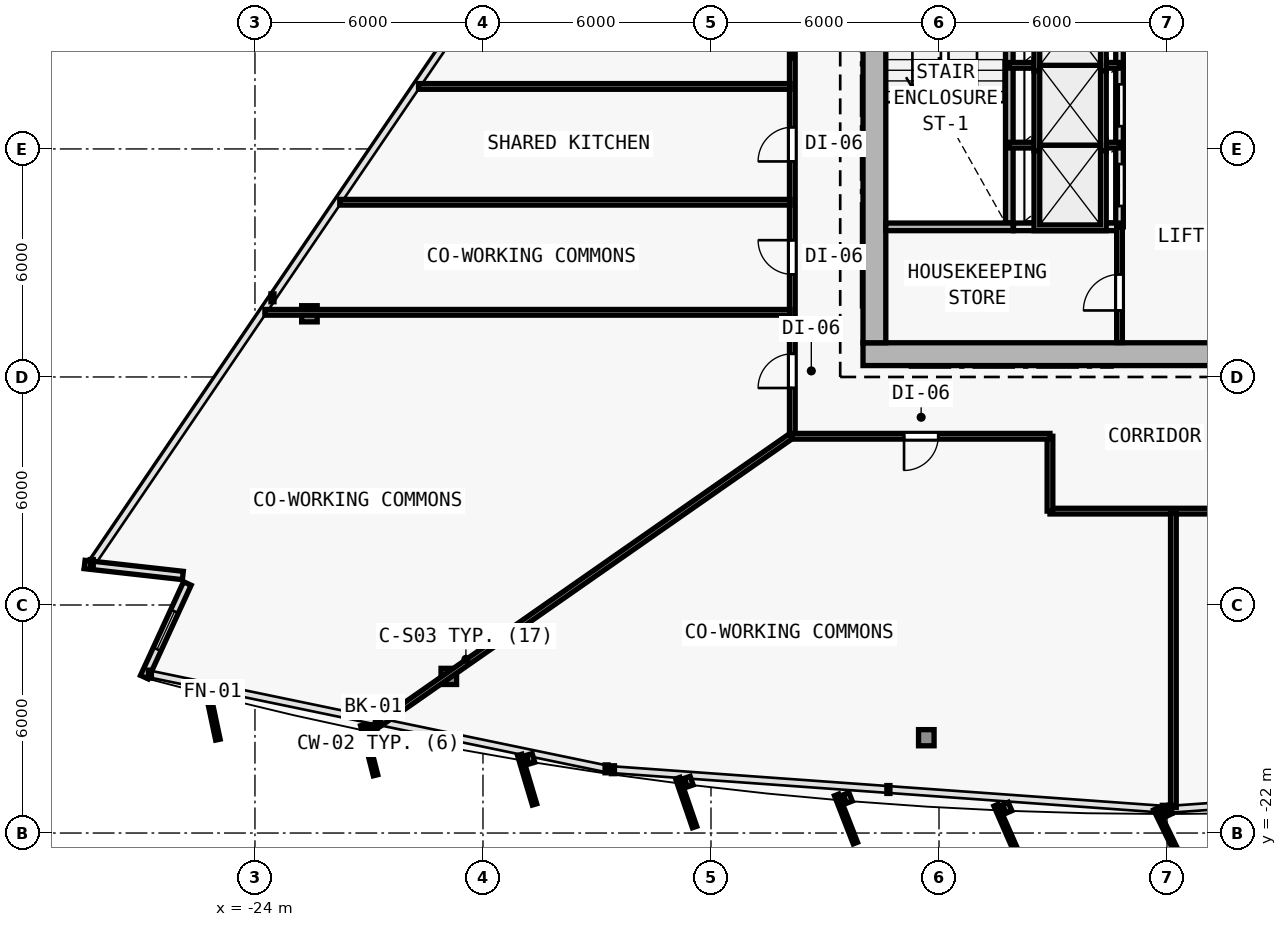
"""IFC4 building model, lengths in metres.
Left out: names, types, materials, properties, quantities, classifications, styles, units other than length and angle.
Written with IfcOpenShell. Run it as: python <this file> out.ifc"""

import sys

from ifc_helpers import new_model, si_unit, direction, frame, frame_2d, origin, origin_2d, place, context, subcontext, project, spatial, rectangle, i_section, extrude, element, fill, save


model = new_model("IFC4")
c1 = context("Model", 3, precision=1e-05, world=origin(), true_north=direction((0.0, 1.0)))
c2 = subcontext(c1, "Body", "Model", "MODEL_VIEW")
j1 = project(units=[si_unit("LENGTHUNIT", "METRE"), si_unit("PLANEANGLEUNIT", "RADIAN")], contexts=[c1])
p1 = place(None, origin())
s1 = spatial("IfcSite", under=j1, at=p1, CompositionType="ELEMENT")
p2 = place(p1, origin())
s2 = spatial("IfcBuilding", under=s1, at=p2, CompositionType="ELEMENT")
p3 = place(p2, frame((0.0, 0.0, 100.5)))
s3 = spatial("IfcBuildingStorey", under=s2, at=p3, CompositionType="ELEMENT", Elevation=100.5)
for number, where, z_axis, x_axis in (
    (1, (-7.7, -9.4, 0.0), (0.0, 0.0, 1.0), (1.0, 0.0, 0.0)),
    (2, (0.0, -9.4, 0.0), (0.0, 0.0, 1.0), (1.0, 0.0, 0.0)),
):
    element("IfcColumn", number, at=place(p3, frame(where, z_axis=z_axis, x_axis=x_axis)), inside=s3, PredefinedType="COLUMN", context=c2, shape_type="SweptSolid", body=[
        extrude(i_section(OverallWidth=0.409, OverallDepth=0.425, WebThickness=0.021, FlangeThickness=0.034, FilletRadius=0.015, at=origin_2d()), origin(), (0.0, 0.0, 1.0), 3.6),
    ])
p4 = place(p3, frame((-18.899, -17.879, 0.006), z_axis=(0.020664238418, 0.033511412961, 0.999224686671), x_axis=(-0.851183725565, 0.524867855115, 0.0)))
e3 = element("IfcColumn", 3, at=p4, inside=s3, PredefinedType="COLUMN", context=c2, shape_type="SweptSolid", body=[
    extrude(i_section(OverallWidth=0.409, OverallDepth=0.425, WebThickness=0.021, FlangeThickness=0.034, FilletRadius=0.015, at=origin_2d()), origin(), (0.0, 0.0, 1.0), 3.592),
])
p5 = place(p3, frame((-6.334, -19.492, 0.006), z_axis=(0.006866324617, 0.035215407439, 0.999356157066), x_axis=(-0.981516643497, 0.191376797284, 0.0)))
e4 = element("IfcColumn", 4, at=p5, inside=s3, PredefinedType="COLUMN", context=c2, shape_type="SweptSolid", body=[
    extrude(i_section(OverallWidth=0.409, OverallDepth=0.425, WebThickness=0.021, FlangeThickness=0.034, FilletRadius=0.015, at=origin_2d()), origin(), (0.0, 0.0, 1.0), 3.591),
])
p6 = place(p3, frame((-22.567, -8.338, 0.006), z_axis=(0.025224163578, 0.021620711639, 0.999447990843), x_axis=(-0.650791373456, 0.759256602365, 0.0)))
e5 = element("IfcColumn", 5, at=p6, inside=s3, PredefinedType="COLUMN", context=c2, shape_type="SweptSolid", body=[
    extrude(i_section(OverallWidth=0.409, OverallDepth=0.425, WebThickness=0.021, FlangeThickness=0.034, FilletRadius=0.015, at=origin_2d()), origin(), (0.0, 0.0, 1.0), 3.591),
])
p7 = place(p3, frame((-25.898, -15.223, 0.0), z_axis=(0.0, 0.0, 1.0), x_axis=(-0.993827522589, 0.110936267041, 0.0)))
e6 = element("IfcWall", 6, at=p7, inside=s3, PredefinedType="SOLIDWALL", context=c2, shape_type="SweptSolid", body=[
    extrude(rectangle(XDim=2.601, YDim=0.22, at=frame_2d((1.301, 0.0))), origin(), (0.0, 0.0, 1.0), 3.35),
])
p8 = place(p3, frame((-26.911, -17.897, 0.0), z_axis=(0.0, 0.0, 1.0), x_axis=(0.417504190978, 0.908674997189, 0.0)))
e7 = element("IfcWall", 7, at=p8, inside=s3, PredefinedType="SOLIDWALL", context=c2, shape_type="SweptSolid", body=[
    extrude(rectangle(XDim=2.711, YDim=0.22, at=frame_2d((1.355, 0.0))), origin(), (0.0, 0.0, 1.0), 3.35),
])
p9 = place(p8, frame((0.805, 0.0, 0.62)))
e8 = element("IfcOpeningElement", 8, at=p9, cuts=e7, PredefinedType="OPENING", context=c2, shape_type="SweptSolid", body=[
    extrude(rectangle(XDim=1.1, YDim=1.8, at=frame_2d((0.55, 0.9))), frame((0.0, 0.12, 0.0), z_axis=(0.0, -1.0, 0.0), x_axis=(1.0, 0.0, 0.0)), (0.0, 0.0, 1.0), 0.24),
])
p10 = place(p3, frame((-8.0, -9.4, 0.0), z_axis=(0.0, 0.0, 1.0), x_axis=(1.0, 0.0, 0.0)))
e9 = element("IfcWall", 9, at=p10, inside=s3, PredefinedType="SHEAR", context=c2, shape_type="SweptSolid", body=[
    extrude(rectangle(XDim=16.0, YDim=0.6, at=frame_2d((8.0, 0.0))), origin(), (0.0, 0.0, 1.0), 3.35),
])
p11 = place(p10, frame((9.65, 0.0, 0.0)))
e10 = element("IfcOpeningElement", 10, at=p11, cuts=e9, PredefinedType="OPENING", context=c2, shape_type="SweptSolid", body=[
    extrude(rectangle(XDim=1.5, YDim=2.2, at=frame_2d((0.75, 1.1))), frame((0.0, 0.31, 0.0), z_axis=(0.0, -1.0, 0.0), x_axis=(1.0, 0.0, 0.0)), (0.0, 0.0, 1.0), 0.62),
])
p12 = place(p3, frame((-7.7, -9.1, 0.0), z_axis=(0.0, 0.0, 1.0), x_axis=(0.0, 1.0, 0.0)))
e11 = element("IfcWall", 11, at=p12, inside=s3, PredefinedType="SHEAR", context=c2, shape_type="SweptSolid", body=[
    extrude(rectangle(XDim=19.0, YDim=0.6, at=frame_2d((9.5, 0.0))), origin(), (0.0, 0.0, 1.0), 3.35),
])
p13 = place(p12, frame((12.65, 0.0, 0.0)))
e12 = element("IfcOpeningElement", 12, at=p13, cuts=e11, PredefinedType="OPENING", context=c2, shape_type="SweptSolid", body=[
    extrude(rectangle(XDim=1.1, YDim=2.15, at=frame_2d((0.55, 1.075))), frame((0.0, 0.31, 0.0), z_axis=(0.0, -1.0, 0.0), x_axis=(1.0, 0.0, 0.0)), (0.0, 0.0, 1.0), 0.62),
])
p14 = place(p3, frame((-4.15, -5.95, 0.0), z_axis=(0.0, 0.0, 1.0), x_axis=(0.0, 1.0, 0.0)))
e13 = element("IfcWall", 13, at=p14, inside=s3, PredefinedType="SOLIDWALL", context=c2, shape_type="SweptSolid", body=[
    extrude(rectangle(XDim=7.2, YDim=0.2, at=frame_2d((3.6, 0.0))), origin(), (0.0, 0.0, 1.0), 3.35),
])
p15 = place(p3, frame((-1.25, -6.05, 0.0), z_axis=(0.0, 0.0, 1.0), x_axis=(0.0, 1.0, 0.0)))
e14 = element("IfcWall", 14, at=p15, inside=s3, PredefinedType="SOLIDWALL", context=c2, shape_type="SweptSolid", body=[
    extrude(rectangle(XDim=8.7, YDim=0.2, at=frame_2d((4.35, 0.0))), origin(), (0.0, 0.0, 1.0), 3.35),
])
p16 = place(p15, frame((0.55, 0.0, 0.0)))
e15 = element("IfcOpeningElement", 15, at=p16, cuts=e14, PredefinedType="OPENING", context=c2, shape_type="SweptSolid", body=[
    extrude(rectangle(XDim=1.1, YDim=2.15, at=frame_2d((0.55, 1.075))), frame((0.0, 0.11, 0.0), z_axis=(0.0, -1.0, 0.0), x_axis=(1.0, 0.0, 0.0)), (0.0, 0.0, 1.0), 0.22),
])
p17 = place(p15, frame((2.65, 0.0, 0.0)))
e16 = element("IfcOpeningElement", 16, at=p17, cuts=e14, PredefinedType="OPENING", context=c2, shape_type="SweptSolid", body=[
    extrude(rectangle(XDim=1.1, YDim=2.15, at=frame_2d((0.55, 1.075))), frame((0.0, 0.11, 0.0), z_axis=(0.0, -1.0, 0.0), x_axis=(1.0, 0.0, 0.0)), (0.0, 0.0, 1.0), 0.22),
])
p18 = place(p15, frame((4.75, 0.0, 0.0)))
e17 = element("IfcOpeningElement", 17, at=p18, cuts=e14, PredefinedType="OPENING", context=c2, shape_type="SweptSolid", body=[
    extrude(rectangle(XDim=1.1, YDim=2.15, at=frame_2d((0.55, 1.075))), frame((0.0, 0.11, 0.0), z_axis=(0.0, -1.0, 0.0), x_axis=(1.0, 0.0, 0.0)), (0.0, 0.0, 1.0), 0.22),
])
p19 = place(p15, frame((6.85, 0.0, 0.0)))
e18 = element("IfcOpeningElement", 18, at=p19, cuts=e14, PredefinedType="OPENING", context=c2, shape_type="SweptSolid", body=[
    extrude(rectangle(XDim=1.1, YDim=2.15, at=frame_2d((0.55, 1.075))), frame((0.0, 0.11, 0.0), z_axis=(0.0, -1.0, 0.0), x_axis=(1.0, 0.0, 0.0)), (0.0, 0.0, 1.0), 0.22),
])
for number, where, z_axis, x_axis in (
    (19, (-4.15, -3.9, 0.0), (0.0, 0.0, 1.0), (1.0, 0.0, 0.0)),
    (20, (-4.15, -1.8, 0.0), (0.0, 0.0, 1.0), (1.0, 0.0, 0.0)),
):
    element("IfcWall", number, at=place(p3, frame(where, z_axis=z_axis, x_axis=x_axis)), inside=s3, PredefinedType="PARTITIONING", context=c2, shape_type="SweptSolid", body=[
        extrude(rectangle(XDim=2.9, YDim=0.15, at=frame_2d((1.45, 0.0))), origin(), (0.0, 0.0, 1.0), 3.35),
    ])
p20 = place(p3, frame((-7.4, -6.05, 0.0), z_axis=(0.0, 0.0, 1.0), x_axis=(1.0, 0.0, 0.0)))
e21 = element("IfcWall", 21, at=p20, inside=s3, PredefinedType="SOLIDWALL", context=c2, shape_type="SweptSolid", body=[
    extrude(rectangle(XDim=3.35, YDim=0.2, at=frame_2d((1.675, 0.0))), origin(), (0.0, 0.0, 1.0), 3.35),
])
p21 = place(p3, frame((-4.04, -6.05, 0.0), z_axis=(0.0, 0.0, 1.0), x_axis=(1.0, 0.0, 0.0)))
e22 = element("IfcWall", 22, at=p21, inside=s3, PredefinedType="SOLIDWALL", context=c2, shape_type="SweptSolid", body=[
    extrude(rectangle(XDim=2.79, YDim=0.2, at=frame_2d((1.395, 0.0))), origin(), (0.0, 0.0, 1.0), 3.35),
])
p22 = place(p3, frame((-1.25, -9.095, 0.0), z_axis=(0.0, 0.0, 1.0), x_axis=(0.0, 1.0, 0.0)))
e23 = element("IfcWall", 23, at=p22, inside=s3, PredefinedType="PARTITIONING", context=c2, shape_type="SweptSolid", body=[
    extrude(rectangle(XDim=3.045, YDim=0.15, at=frame_2d((1.522, 0.0))), origin(), (0.0, 0.0, 1.0), 3.35),
])
p23 = place(p22, frame((0.845, 0.0, 0.0)))
e24 = element("IfcOpeningElement", 24, at=p23, cuts=e23, PredefinedType="OPENING", context=c2, shape_type="SweptSolid", body=[
    extrude(rectangle(XDim=0.95, YDim=2.1, at=frame_2d((0.475, 1.05))), frame((0.0, 0.085, 0.0), z_axis=(0.0, -1.0, 0.0), x_axis=(1.0, 0.0, 0.0)), (0.0, 0.0, 1.0), 0.17),
])
p24 = place(p3, frame((-9.86, -11.56, 0.0), z_axis=(0.0, 0.0, 1.0), x_axis=(0.0, 1.0, 0.0)))
e25 = element("IfcWall", 25, at=p24, inside=s3, PredefinedType="PARTITIONING", context=c2, shape_type="SweptSolid", body=[
    extrude(rectangle(XDim=19.986, YDim=0.15, at=frame_2d((9.993, 0.0))), origin(), (0.0, 0.0, 1.0), 2.705),
])
p25 = place(p24, frame((10.241, 0.0, 0.0)))
e26 = element("IfcOpeningElement", 26, at=p25, cuts=e25, PredefinedType="OPENING", context=c2, shape_type="SweptSolid", body=[
    extrude(rectangle(XDim=0.9, YDim=2.1, at=frame_2d((0.45, 1.05))), frame((0.0, 0.085, 0.0), z_axis=(0.0, -1.0, 0.0), x_axis=(1.0, 0.0, 0.0)), (0.0, 0.0, 1.0), 0.17),
])
p26 = place(p24, frame((7.231, 0.0, 0.0)))
e27 = element("IfcOpeningElement", 27, at=p26, cuts=e25, PredefinedType="OPENING", context=c2, shape_type="SweptSolid", body=[
    extrude(rectangle(XDim=0.9, YDim=2.1, at=frame_2d((0.45, 1.05))), frame((0.0, 0.085, 0.0), z_axis=(0.0, -1.0, 0.0), x_axis=(1.0, 0.0, 0.0)), (0.0, 0.0, 1.0), 0.17),
])
p27 = place(p24, frame((4.259, 0.0, 0.0)))
e28 = element("IfcOpeningElement", 28, at=p27, cuts=e25, PredefinedType="OPENING", context=c2, shape_type="SweptSolid", body=[
    extrude(rectangle(XDim=0.9, YDim=2.1, at=frame_2d((0.45, 1.05))), frame((0.0, 0.085, 0.0), z_axis=(0.0, -1.0, 0.0), x_axis=(1.0, 0.0, 0.0)), (0.0, 0.0, 1.0), 0.17),
])
p28 = place(p24, frame((1.27, 0.0, 0.0)))
e29 = element("IfcOpeningElement", 29, at=p28, cuts=e25, PredefinedType="OPENING", context=c2, shape_type="SweptSolid", body=[
    extrude(rectangle(XDim=0.9, YDim=2.1, at=frame_2d((0.45, 1.05))), frame((0.0, 0.085, 0.0), z_axis=(0.0, -1.0, 0.0), x_axis=(1.0, 0.0, 0.0)), (0.0, 0.0, 1.0), 0.17),
])
p29 = place(p24, frame((16.663, 0.0, 0.0)))
e30 = element("IfcOpeningElement", 30, at=p29, cuts=e25, PredefinedType="OPENING", context=c2, shape_type="SweptSolid", body=[
    extrude(rectangle(XDim=0.9, YDim=2.1, at=frame_2d((0.45, 1.05))), frame((0.0, 0.085, 0.0), z_axis=(0.0, -1.0, 0.0), x_axis=(1.0, 0.0, 0.0)), (0.0, 0.0, 1.0), 0.17),
])
p30 = place(p24, frame((12.847, 0.0, 0.0)))
e31 = element("IfcOpeningElement", 31, at=p30, cuts=e25, PredefinedType="OPENING", context=c2, shape_type="SweptSolid", body=[
    extrude(rectangle(XDim=0.9, YDim=2.1, at=frame_2d((0.45, 1.05))), frame((0.0, 0.085, 0.0), z_axis=(0.0, -1.0, 0.0), x_axis=(1.0, 0.0, 0.0)), (0.0, 0.0, 1.0), 0.17),
])
p31 = place(p3, frame((3.08, -13.53, 0.0), z_axis=(0.0, 0.0, 1.0), x_axis=(-1.0, 0.0, 0.0)))
e32 = element("IfcWall", 32, at=p31, inside=s3, PredefinedType="PARTITIONING", context=c2, shape_type="SweptSolid", body=[
    extrude(rectangle(XDim=6.16, YDim=0.15, at=frame_2d((3.08, 0.0))), origin(), (0.0, 0.0, 1.0), 2.775),
])
p32 = place(p3, frame((-3.08, -13.53, 0.0), z_axis=(0.0, 0.0, 1.0), x_axis=(0.0, 1.0, 0.0)))
e33 = element("IfcWall", 33, at=p32, inside=s3, PredefinedType="PARTITIONING", context=c2, shape_type="SweptSolid", body=[
    extrude(rectangle(XDim=1.97, YDim=0.15, at=frame_2d((0.985, 0.0))), origin(), (0.0, 0.0, 1.0), 2.775),
])
p33 = place(p3, frame((-3.08, -11.56, 0.0), z_axis=(0.0, 0.0, 1.0), x_axis=(-1.0, 0.0, 0.0)))
e34 = element("IfcWall", 34, at=p33, inside=s3, PredefinedType="PARTITIONING", context=c2, shape_type="SweptSolid", body=[
    extrude(rectangle(XDim=6.78, YDim=0.15, at=frame_2d((3.39, 0.0))), origin(), (0.0, 0.0, 1.0), 3.35),
])
p34 = place(p33, frame((2.94, 0.0, 0.0)))
e35 = element("IfcOpeningElement", 35, at=p34, cuts=e34, PredefinedType="OPENING", context=c2, shape_type="SweptSolid", body=[
    extrude(rectangle(XDim=0.9, YDim=2.1, at=frame_2d((0.45, 1.05))), frame((0.0, 0.085, 0.0), z_axis=(0.0, -1.0, 0.0), x_axis=(1.0, 0.0, 0.0)), (0.0, 0.0, 1.0), 0.17),
])
p35 = place(p3, frame((-9.896, -11.558, 0.0), z_axis=(0.0, 0.0, 1.0), x_axis=(-0.819892596191, -0.572517362803, 0.0)))
e36 = element("IfcWall", 36, at=p35, inside=s3, PredefinedType="PARTITIONING", context=c2, shape_type="SweptSolid", body=[
    extrude(rectangle(XDim=13.339, YDim=0.15, at=frame_2d((6.67, 0.0))), origin(), (0.0, 0.0, 1.0), 2.725),
])
p36 = place(p3, frame((-9.92, -8.299, 0.0), z_axis=(0.0, 0.0, 1.0), x_axis=(-1.0, 0.0, 0.0)))
e37 = element("IfcWall", 37, at=p36, inside=s3, PredefinedType="PARTITIONING", context=c2, shape_type="SweptSolid", body=[
    extrude(rectangle(XDim=13.818, YDim=0.15, at=frame_2d((6.909, 0.0))), origin(), (0.0, 0.0, 1.0), 2.705),
])
p37 = place(p3, frame((-9.92, -2.355, 0.0), z_axis=(0.0, 0.0, 1.0), x_axis=(-1.0, 0.0, 0.0)))
e38 = element("IfcWall", 38, at=p37, inside=s3, PredefinedType="PARTITIONING", context=c2, shape_type="SweptSolid", body=[
    extrude(rectangle(XDim=9.775, YDim=0.15, at=frame_2d((4.888, 0.0))), origin(), (0.0, 0.0, 1.0), 2.725),
])
p38 = place(p3, frame((-9.92, -5.402, 0.0), z_axis=(0.0, 0.0, 1.0), x_axis=(-1.0, 0.0, 0.0)))
e39 = element("IfcWall", 39, at=p38, inside=s3, PredefinedType="PARTITIONING", context=c2, shape_type="SweptSolid", body=[
    extrude(rectangle(XDim=11.848, YDim=0.15, at=frame_2d((5.924, 0.0))), origin(), (0.0, 0.0, 1.0), 2.725),
])
p39 = place(p3, frame((0.167, -13.59, 0.0), z_axis=(0.0, 0.0, 1.0), x_axis=(0.0, -1.0, 0.0)))
e40 = element("IfcWall", 40, at=p39, inside=s3, PredefinedType="PARTITIONING", context=c2, shape_type="SweptSolid", body=[
    extrude(rectangle(XDim=7.739, YDim=0.15, at=frame_2d((3.87, 0.0))), origin(), (0.0, 0.0, 1.0), 2.825),
])
p40 = place(p9, origin())
e41 = element("IfcWindow", 41, at=p40, inside=s3, PartitioningType="SINGLE_PANEL", PredefinedType="WINDOW", context=c2, shape_type="SweptSolid", body=[
    extrude(rectangle(XDim=1.1, YDim=1.8, at=frame_2d((0.55, 0.9))), frame((0.0, 0.03, 0.0), z_axis=(0.0, -1.0, 0.0), x_axis=(1.0, 0.0, 0.0)), (0.0, 0.0, 1.0), 0.06),
])
fill(e8, e41)
p41 = place(p16, origin())
e42 = element("IfcDoor", 42, at=p41, inside=s3, OperationType="DOUBLE_DOOR_SLIDING", PredefinedType="DOOR", context=c2, shape_type="SweptSolid", body=[
    extrude(rectangle(XDim=1.1, YDim=2.15, at=frame_2d((0.55, 1.075))), frame((0.0, 0.025, 0.0), z_axis=(0.0, -1.0, 0.0), x_axis=(1.0, 0.0, 0.0)), (0.0, 0.0, 1.0), 0.05),
])
fill(e15, e42)
p42 = place(p17, origin())
e43 = element("IfcDoor", 43, at=p42, inside=s3, OperationType="DOUBLE_DOOR_SLIDING", PredefinedType="DOOR", context=c2, shape_type="SweptSolid", body=[
    extrude(rectangle(XDim=1.1, YDim=2.15, at=frame_2d((0.55, 1.075))), frame((0.0, 0.025, 0.0), z_axis=(0.0, -1.0, 0.0), x_axis=(1.0, 0.0, 0.0)), (0.0, 0.0, 1.0), 0.05),
])
fill(e16, e43)
p43 = place(p23, origin())
e44 = element("IfcDoor", 44, at=p43, inside=s3, OperationType="SINGLE_SWING_LEFT", PredefinedType="DOOR", context=c2, shape_type="SweptSolid", body=[
    extrude(rectangle(XDim=0.95, YDim=2.1, at=frame_2d((0.475, 1.05))), frame((0.0, 0.025, 0.0), z_axis=(0.0, -1.0, 0.0), x_axis=(1.0, 0.0, 0.0)), (0.0, 0.0, 1.0), 0.05),
])
fill(e24, e44)
p44 = place(p26, origin())
e45 = element("IfcDoor", 45, at=p44, inside=s3, OperationType="SINGLE_SWING_LEFT", PredefinedType="DOOR", context=c2, shape_type="SweptSolid", body=[
    extrude(rectangle(XDim=0.9, YDim=2.1, at=frame_2d((0.45, 1.05))), frame((0.0, 0.025, 0.0), z_axis=(0.0, -1.0, 0.0), x_axis=(1.0, 0.0, 0.0)), (0.0, 0.0, 1.0), 0.05),
])
fill(e27, e45)
p45 = place(p27, origin())
e46 = element("IfcDoor", 46, at=p45, inside=s3, OperationType="SINGLE_SWING_RIGHT", PredefinedType="DOOR", context=c2, shape_type="SweptSolid", body=[
    extrude(rectangle(XDim=0.9, YDim=2.1, at=frame_2d((0.45, 1.05))), frame((0.0, 0.025, 0.0), z_axis=(0.0, -1.0, 0.0), x_axis=(1.0, 0.0, 0.0)), (0.0, 0.0, 1.0), 0.05),
])
fill(e28, e46)
p46 = place(p28, origin())
e47 = element("IfcDoor", 47, at=p46, inside=s3, OperationType="SINGLE_SWING_LEFT", PredefinedType="DOOR", context=c2, shape_type="SweptSolid", body=[
    extrude(rectangle(XDim=0.9, YDim=2.1, at=frame_2d((0.45, 1.05))), frame((0.0, 0.025, 0.0), z_axis=(0.0, -1.0, 0.0), x_axis=(1.0, 0.0, 0.0)), (0.0, 0.0, 1.0), 0.05),
])
fill(e29, e47)
p47 = place(p34, origin())
e48 = element("IfcDoor", 48, at=p47, inside=s3, OperationType="SINGLE_SWING_RIGHT", PredefinedType="DOOR", context=c2, shape_type="SweptSolid", body=[
    extrude(rectangle(XDim=0.9, YDim=2.1, at=frame_2d((0.45, 1.05))), frame((0.0, 0.025, 0.0), z_axis=(0.0, -1.0, 0.0), x_axis=(1.0, 0.0, 0.0)), (0.0, 0.0, 1.0), 0.05),
])
fill(e35, e48)
save(model, sys.argv[1])
